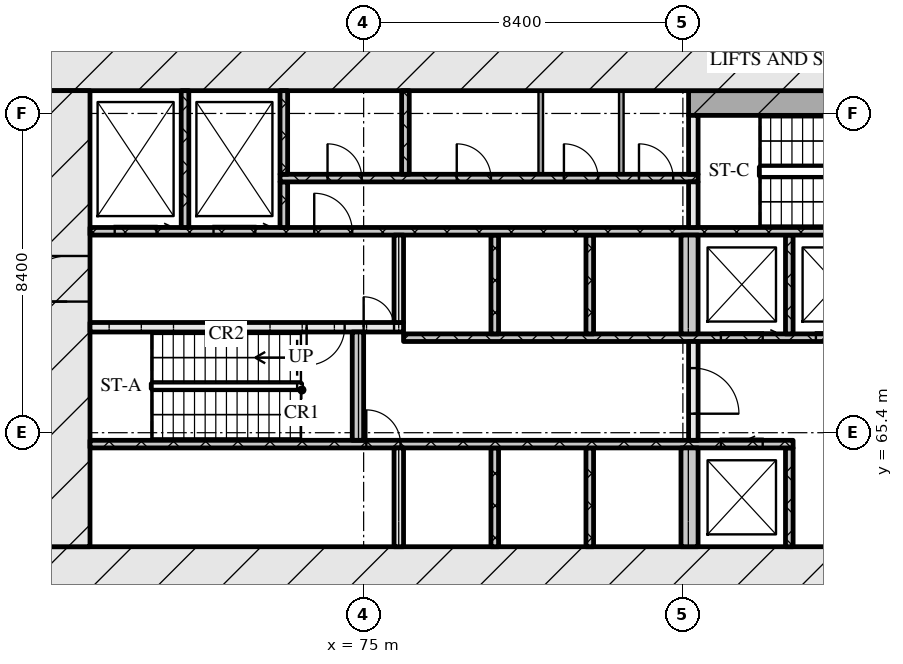
"""IFC4 building model, lengths in metres.
Left out: names, types, materials, properties, quantities, classifications, styles, units other than length and angle.
Written with IfcOpenShell. Run it as: python <this file> out.ifc"""

import sys

from ifc_helpers import new_model, si_unit, direction, frame, frame_2d, origin, place, context, subcontext, project, spatial, rectangle, extrude, element, fill, save


model = new_model("IFC4")
c1 = context("Model", 3, precision=1e-05, world=origin(), true_north=direction((0.0, 1.0)))
c2 = subcontext(c1, "Body", "Model", "MODEL_VIEW")
j1 = project(units=[si_unit("LENGTHUNIT", "METRE"), si_unit("PLANEANGLEUNIT", "RADIAN")], contexts=[c1])
p1 = place(None, origin())
s1 = spatial("IfcSite", under=j1, at=p1, CompositionType="ELEMENT")
p2 = place(p1, origin())
s2 = spatial("IfcBuilding", under=s1, at=p2, CompositionType="ELEMENT")
p3 = place(p2, frame((0.0, 0.0, 9.0)))
s3 = spatial("IfcBuildingStorey", under=s2, at=p3, CompositionType="ELEMENT", Elevation=9.0)
p4 = place(p3, frame((66.6, 61.8, 0.0), z_axis=(0.0, 0.0, 1.0), x_axis=(1.0, 0.0, 0.0)))
e1 = element("IfcWall", 1, at=p4, inside=s3, PredefinedType="SOLIDWALL", context=c2, shape_type="SweptSolid", body=[
    extrude(rectangle(XDim=42.0, YDim=1.2, at=frame_2d((21.0, 0.0))), origin(), (0.0, 0.0, 1.0), 5.1),
])
p5 = place(p4, frame((21.35, 0.0, 0.0)))
e2 = element("IfcOpeningElement", 2, at=p5, cuts=e1, PredefinedType="OPENING", context=c2, shape_type="SweptSolid", body=[
    extrude(rectangle(XDim=1.8, YDim=2.1, at=frame_2d((0.9, 1.05))), frame((0.0, 0.61, 0.0), z_axis=(0.0, -1.0, 0.0), x_axis=(1.0, 0.0, 0.0)), (0.0, 0.0, 1.0), 1.22),
])
p6 = place(p3, frame((66.6, 75.0, 0.0), z_axis=(0.0, 0.0, 1.0), x_axis=(1.0, 0.0, 0.0)))
e3 = element("IfcWall", 3, at=p6, inside=s3, PredefinedType="SOLIDWALL", context=c2, shape_type="SweptSolid", body=[
    extrude(rectangle(XDim=42.0, YDim=1.2, at=frame_2d((21.0, 0.0))), origin(), (0.0, 0.0, 1.0), 5.1),
])
p7 = place(p3, frame((67.2, 62.4, 0.0), z_axis=(0.0, 0.0, 1.0), x_axis=(0.0, 1.0, 0.0)))
e4 = element("IfcWall", 4, at=p7, inside=s3, PredefinedType="SOLIDWALL", context=c2, shape_type="SweptSolid", body=[
    extrude(rectangle(XDim=12.0, YDim=1.2, at=frame_2d((6.0, 0.0))), origin(), (0.0, 0.0, 1.0), 5.1),
])
p8 = place(p7, frame((6.45, 0.0, 0.0)))
e5 = element("IfcOpeningElement", 5, at=p8, cuts=e4, PredefinedType="OPENING", context=c2, shape_type="SweptSolid", body=[
    extrude(rectangle(XDim=1.2, YDim=2.1, at=frame_2d((0.6, 1.05))), frame((0.0, 0.61, 0.0), z_axis=(0.0, -1.0, 0.0), x_axis=(1.0, 0.0, 0.0)), (0.0, 0.0, 1.0), 1.22),
])
p9 = place(p3, frame((75.925, 62.4, 0.0), z_axis=(0.0, 0.0, 1.0), x_axis=(0.0, 1.0, 0.0)))
e6 = element("IfcWall", 6, at=p9, inside=s3, PredefinedType="SOLIDWALL", context=c2, shape_type="SweptSolid", body=[
    extrude(rectangle(XDim=2.6, YDim=0.25, at=frame_2d((1.3, 0.0))), origin(), (0.0, 0.0, 1.0), 5.1),
])
for number, where, z_axis, x_axis in (
    (7, (78.45, 62.4, 0.0), (0.0, 0.0, 1.0), (0.0, 1.0, 0.0)),
    (8, (80.95, 62.4, 0.0), (0.0, 0.0, 1.0), (0.0, 1.0, 0.0)),
):
    element("IfcWall", number, at=place(p3, frame(where, z_axis=z_axis, x_axis=x_axis)), inside=s3, PredefinedType="SOLIDWALL", context=c2, shape_type="SweptSolid", body=[
        extrude(rectangle(XDim=2.6, YDim=0.2, at=frame_2d((1.3, 0.0))), origin(), (0.0, 0.0, 1.0), 5.1),
    ])
p10 = place(p3, frame((83.575, 62.4, 0.0), z_axis=(0.0, 0.0, 1.0), x_axis=(0.0, 1.0, 0.0)))
e9 = element("IfcWall", 9, at=p10, inside=s3, PredefinedType="SOLIDWALL", context=c2, shape_type="SweptSolid", body=[
    extrude(rectangle(XDim=2.6, YDim=0.45, at=frame_2d((1.3, 0.0))), origin(), (0.0, 0.0, 1.0), 5.1),
])
p11 = place(p3, frame((86.2, 62.4, 0.0), z_axis=(0.0, 0.0, 1.0), x_axis=(0.0, 1.0, 0.0)))
e10 = element("IfcWall", 10, at=p11, inside=s3, PredefinedType="SOLIDWALL", context=c2, shape_type="SweptSolid", body=[
    extrude(rectangle(XDim=2.6, YDim=0.2, at=frame_2d((1.3, 0.0))), origin(), (0.0, 0.0, 1.0), 5.1),
])
p12 = place(p3, frame((67.8, 65.1, 0.0), z_axis=(0.0, 0.0, 1.0), x_axis=(1.0, 0.0, 0.0)))
e11 = element("IfcWall", 11, at=p12, inside=s3, PredefinedType="SOLIDWALL", context=c2, shape_type="SweptSolid", body=[
    extrude(rectangle(XDim=18.5, YDim=0.2, at=frame_2d((9.25, 0.0))), origin(), (0.0, 0.0, 1.0), 5.1),
])
p13 = place(p12, frame((7.27, 0.0, 0.0)))
e12 = element("IfcOpeningElement", 12, at=p13, cuts=e11, PredefinedType="OPENING", context=c2, shape_type="SweptSolid", body=[
    extrude(rectangle(XDim=0.9, YDim=2.1, at=frame_2d((0.45, 1.05))), frame((0.0, 0.11, 0.0), z_axis=(0.0, -1.0, 0.0), x_axis=(1.0, 0.0, 0.0)), (0.0, 0.0, 1.0), 0.22),
])
p14 = place(p12, frame((16.6, 0.0, 0.0)))
e13 = element("IfcOpeningElement", 13, at=p14, cuts=e11, PredefinedType="OPENING", context=c2, shape_type="SweptSolid", body=[
    extrude(rectangle(XDim=1.1, YDim=2.1, at=frame_2d((0.55, 1.05))), frame((0.0, 0.11, 0.0), z_axis=(0.0, -1.0, 0.0), x_axis=(1.0, 0.0, 0.0)), (0.0, 0.0, 1.0), 0.22),
])
p15 = place(p3, frame((74.85, 65.2, 0.0), z_axis=(0.0, 0.0, 1.0), x_axis=(0.0, 1.0, 0.0)))
e14 = element("IfcWall", 14, at=p15, inside=s3, PredefinedType="SOLIDWALL", context=c2, shape_type="SweptSolid", body=[
    extrude(rectangle(XDim=2.85, YDim=0.3, at=frame_2d((1.425, 0.0))), origin(), (0.0, 0.0, 1.0), 5.1),
])
p16 = place(p3, frame((83.675, 65.2, 0.0), z_axis=(0.0, 0.0, 1.0), x_axis=(0.0, 1.0, 0.0)))
e15 = element("IfcWall", 15, at=p16, inside=s3, PredefinedType="SOLIDWALL", context=c2, shape_type="SweptSolid", body=[
    extrude(rectangle(XDim=2.6, YDim=0.25, at=frame_2d((1.3, 0.0))), origin(), (0.0, 0.0, 1.0), 5.1),
])
p17 = place(p16, frame((0.7, 0.0, 0.0)))
e16 = element("IfcOpeningElement", 16, at=p17, cuts=e15, PredefinedType="OPENING", context=c2, shape_type="SweptSolid", body=[
    extrude(rectangle(XDim=1.2, YDim=2.1, at=frame_2d((0.6, 1.05))), frame((0.0, 0.135, 0.0), z_axis=(0.0, -1.0, 0.0), x_axis=(1.0, 0.0, 0.0)), (0.0, 0.0, 1.0), 0.27),
])
p18 = place(p3, frame((76.05, 67.9, 0.0), z_axis=(0.0, 0.0, 1.0), x_axis=(1.0, 0.0, 0.0)))
e17 = element("IfcWall", 17, at=p18, inside=s3, PredefinedType="SOLIDWALL", context=c2, shape_type="SweptSolid", body=[
    extrude(rectangle(XDim=23.1, YDim=0.2, at=frame_2d((11.55, 0.0))), origin(), (0.0, 0.0, 1.0), 5.1),
])
p19 = place(p18, frame((8.35, 0.0, 0.0)))
e18 = element("IfcOpeningElement", 18, at=p19, cuts=e17, PredefinedType="OPENING", context=c2, shape_type="SweptSolid", body=[
    extrude(rectangle(XDim=1.1, YDim=2.1, at=frame_2d((0.55, 1.05))), frame((0.0, 0.11, 0.0), z_axis=(0.0, -1.0, 0.0), x_axis=(1.0, 0.0, 0.0)), (0.0, 0.0, 1.0), 0.22),
])
p20 = place(p18, frame((10.85, 0.0, 0.0)))
e19 = element("IfcOpeningElement", 19, at=p20, cuts=e17, PredefinedType="OPENING", context=c2, shape_type="SweptSolid", body=[
    extrude(rectangle(XDim=1.1, YDim=2.1, at=frame_2d((0.55, 1.05))), frame((0.0, 0.11, 0.0), z_axis=(0.0, -1.0, 0.0), x_axis=(1.0, 0.0, 0.0)), (0.0, 0.0, 1.0), 0.22),
])
p21 = place(p18, frame((13.55, 0.0, 0.0)))
e20 = element("IfcOpeningElement", 20, at=p21, cuts=e17, PredefinedType="OPENING", context=c2, shape_type="SweptSolid", body=[
    extrude(rectangle(XDim=1.0, YDim=2.1, at=frame_2d((0.5, 1.05))), frame((0.0, 0.11, 0.0), z_axis=(0.0, -1.0, 0.0), x_axis=(1.0, 0.0, 0.0)), (0.0, 0.0, 1.0), 0.22),
])
for number, where, z_axis, x_axis in (
    (21, (78.45, 68.0, 0.0), (0.0, 0.0, 1.0), (0.0, 1.0, 0.0)),
    (22, (80.95, 68.0, 0.0), (0.0, 0.0, 1.0), (0.0, 1.0, 0.0)),
):
    element("IfcWall", number, at=place(p3, frame(where, z_axis=z_axis, x_axis=x_axis)), inside=s3, PredefinedType="SOLIDWALL", context=c2, shape_type="SweptSolid", body=[
        extrude(rectangle(XDim=2.6, YDim=0.2, at=frame_2d((1.3, 0.0))), origin(), (0.0, 0.0, 1.0), 5.1),
    ])
p22 = place(p3, frame((83.575, 68.0, 0.0), z_axis=(0.0, 0.0, 1.0), x_axis=(0.0, 1.0, 0.0)))
e23 = element("IfcWall", 23, at=p22, inside=s3, PredefinedType="SOLIDWALL", context=c2, shape_type="SweptSolid", body=[
    extrude(rectangle(XDim=2.6, YDim=0.45, at=frame_2d((1.3, 0.0))), origin(), (0.0, 0.0, 1.0), 5.1),
])
p23 = place(p3, frame((86.2, 68.0, 0.0), z_axis=(0.0, 0.0, 1.0), x_axis=(0.0, 1.0, 0.0)))
e24 = element("IfcWall", 24, at=p23, inside=s3, PredefinedType="SOLIDWALL", context=c2, shape_type="SweptSolid", body=[
    extrude(rectangle(XDim=2.6, YDim=0.2, at=frame_2d((1.3, 0.0))), origin(), (0.0, 0.0, 1.0), 5.1),
])
p24 = place(p3, frame((67.8, 68.175, 0.0), z_axis=(0.0, 0.0, 1.0), x_axis=(1.0, 0.0, 0.0)))
e25 = element("IfcWall", 25, at=p24, inside=s3, PredefinedType="SOLIDWALL", context=c2, shape_type="SweptSolid", body=[
    extrude(rectangle(XDim=8.25, YDim=0.25, at=frame_2d((4.125, 0.0))), origin(), (0.0, 0.0, 1.0), 5.1),
])
p25 = place(p24, frame((5.7, 0.0, 0.0)))
e26 = element("IfcOpeningElement", 26, at=p25, cuts=e25, PredefinedType="OPENING", context=c2, shape_type="SweptSolid", body=[
    extrude(rectangle(XDim=1.0, YDim=2.1, at=frame_2d((0.5, 1.05))), frame((0.0, 0.135, 0.0), z_axis=(0.0, -1.0, 0.0), x_axis=(1.0, 0.0, 0.0)), (0.0, 0.0, 1.0), 0.27),
])
p26 = place(p24, frame((7.2, 0.0, 0.0)))
e27 = element("IfcOpeningElement", 27, at=p26, cuts=e25, PredefinedType="OPENING", context=c2, shape_type="SweptSolid", body=[
    extrude(rectangle(XDim=0.8, YDim=2.1, at=frame_2d((0.4, 1.05))), frame((0.0, 0.135, 0.0), z_axis=(0.0, -1.0, 0.0), x_axis=(1.0, 0.0, 0.0)), (0.0, 0.0, 1.0), 0.27),
])
p27 = place(p3, frame((75.925, 68.3, 0.0), z_axis=(0.0, 0.0, 1.0), x_axis=(0.0, 1.0, 0.0)))
e28 = element("IfcWall", 28, at=p27, inside=s3, PredefinedType="SOLIDWALL", context=c2, shape_type="SweptSolid", body=[
    extrude(rectangle(XDim=2.3, YDim=0.25, at=frame_2d((1.15, 0.0))), origin(), (0.0, 0.0, 1.0), 5.1),
])
p28 = place(p3, frame((67.8, 70.7, 0.0), z_axis=(0.0, 0.0, 1.0), x_axis=(1.0, 0.0, 0.0)))
e29 = element("IfcWall", 29, at=p28, inside=s3, PredefinedType="SOLIDWALL", context=c2, shape_type="SweptSolid", body=[
    extrude(rectangle(XDim=39.6, YDim=0.2, at=frame_2d((19.8, 0.0))), origin(), (0.0, 0.0, 1.0), 5.1),
])
p29 = place(p28, frame((0.65, 0.0, 0.0)))
e30 = element("IfcOpeningElement", 30, at=p29, cuts=e29, PredefinedType="OPENING", context=c2, shape_type="SweptSolid", body=[
    extrude(rectangle(XDim=1.1, YDim=2.1, at=frame_2d((0.55, 1.05))), frame((0.0, 0.11, 0.0), z_axis=(0.0, -1.0, 0.0), x_axis=(1.0, 0.0, 0.0)), (0.0, 0.0, 1.0), 0.22),
])
p30 = place(p28, frame((3.25, 0.0, 0.0)))
e31 = element("IfcOpeningElement", 31, at=p30, cuts=e29, PredefinedType="OPENING", context=c2, shape_type="SweptSolid", body=[
    extrude(rectangle(XDim=1.1, YDim=2.1, at=frame_2d((0.55, 1.05))), frame((0.0, 0.11, 0.0), z_axis=(0.0, -1.0, 0.0), x_axis=(1.0, 0.0, 0.0)), (0.0, 0.0, 1.0), 0.22),
])
p31 = place(p28, frame((5.9, 0.0, 0.0)))
e32 = element("IfcOpeningElement", 32, at=p31, cuts=e29, PredefinedType="OPENING", context=c2, shape_type="SweptSolid", body=[
    extrude(rectangle(XDim=1.0, YDim=2.1, at=frame_2d((0.5, 1.05))), frame((0.0, 0.11, 0.0), z_axis=(0.0, -1.0, 0.0), x_axis=(1.0, 0.0, 0.0)), (0.0, 0.0, 1.0), 0.22),
])
p32 = place(p28, frame((21.7, 0.0, 0.0)))
e33 = element("IfcOpeningElement", 33, at=p32, cuts=e29, PredefinedType="OPENING", context=c2, shape_type="SweptSolid", body=[
    extrude(rectangle(XDim=1.0, YDim=2.1, at=frame_2d((0.5, 1.05))), frame((0.0, 0.11, 0.0), z_axis=(0.0, -1.0, 0.0), x_axis=(1.0, 0.0, 0.0)), (0.0, 0.0, 1.0), 0.22),
])
p33 = place(p28, frame((32.7, 0.0, 0.0)))
e34 = element("IfcOpeningElement", 34, at=p33, cuts=e29, PredefinedType="OPENING", context=c2, shape_type="SweptSolid", body=[
    extrude(rectangle(XDim=1.0, YDim=2.1, at=frame_2d((0.5, 1.05))), frame((0.0, 0.11, 0.0), z_axis=(0.0, -1.0, 0.0), x_axis=(1.0, 0.0, 0.0)), (0.0, 0.0, 1.0), 0.22),
])
p34 = place(p28, frame((35.25, 0.0, 0.0)))
e35 = element("IfcOpeningElement", 35, at=p34, cuts=e29, PredefinedType="OPENING", context=c2, shape_type="SweptSolid", body=[
    extrude(rectangle(XDim=1.1, YDim=2.1, at=frame_2d((0.55, 1.05))), frame((0.0, 0.11, 0.0), z_axis=(0.0, -1.0, 0.0), x_axis=(1.0, 0.0, 0.0)), (0.0, 0.0, 1.0), 0.22),
])
p35 = place(p28, frame((37.85, 0.0, 0.0)))
e36 = element("IfcOpeningElement", 36, at=p35, cuts=e29, PredefinedType="OPENING", context=c2, shape_type="SweptSolid", body=[
    extrude(rectangle(XDim=1.1, YDim=2.1, at=frame_2d((0.55, 1.05))), frame((0.0, 0.11, 0.0), z_axis=(0.0, -1.0, 0.0), x_axis=(1.0, 0.0, 0.0)), (0.0, 0.0, 1.0), 0.22),
])
p36 = place(p3, frame((70.3, 70.8, 0.0), z_axis=(0.0, 0.0, 1.0), x_axis=(0.0, 1.0, 0.0)))
e37 = element("IfcWall", 37, at=p36, inside=s3, PredefinedType="SOLIDWALL", context=c2, shape_type="SweptSolid", body=[
    extrude(rectangle(XDim=3.6, YDim=0.2, at=frame_2d((1.8, 0.0))), origin(), (0.0, 0.0, 1.0), 5.1),
])
p37 = place(p3, frame((72.9, 70.8, 0.0), z_axis=(0.0, 0.0, 1.0), x_axis=(0.0, 1.0, 0.0)))
e38 = element("IfcWall", 38, at=p37, inside=s3, PredefinedType="SOLIDWALL", context=c2, shape_type="SweptSolid", body=[
    extrude(rectangle(XDim=1.2, YDim=0.2, at=frame_2d((0.6, 0.0))), origin(), (0.0, 0.0, 1.0), 5.1),
])
p38 = place(p3, frame((83.675, 70.8, 0.0), z_axis=(0.0, 0.0, 1.0), x_axis=(0.0, 1.0, 0.0)))
e39 = element("IfcWall", 39, at=p38, inside=s3, PredefinedType="SOLIDWALL", context=c2, shape_type="SweptSolid", body=[
    extrude(rectangle(XDim=1.2, YDim=0.25, at=frame_2d((0.6, 0.0))), origin(), (0.0, 0.0, 1.0), 5.1),
])
p39 = place(p3, frame((72.8, 72.1, 0.0), z_axis=(0.0, 0.0, 1.0), x_axis=(1.0, 0.0, 0.0)))
e40 = element("IfcWall", 40, at=p39, inside=s3, PredefinedType="SOLIDWALL", context=c2, shape_type="SweptSolid", body=[
    extrude(rectangle(XDim=11.0, YDim=0.2, at=frame_2d((5.5, 0.0))), origin(), (0.0, 0.0, 1.0), 5.1),
])
p40 = place(p39, frame((1.25, 0.0, 0.0)))
e41 = element("IfcOpeningElement", 41, at=p40, cuts=e40, PredefinedType="OPENING", context=c2, shape_type="SweptSolid", body=[
    extrude(rectangle(XDim=0.9, YDim=2.1, at=frame_2d((0.45, 1.05))), frame((0.0, 0.11, 0.0), z_axis=(0.0, -1.0, 0.0), x_axis=(1.0, 0.0, 0.0)), (0.0, 0.0, 1.0), 0.22),
])
p41 = place(p39, frame((4.65, 0.0, 0.0)))
e42 = element("IfcOpeningElement", 42, at=p41, cuts=e40, PredefinedType="OPENING", context=c2, shape_type="SweptSolid", body=[
    extrude(rectangle(XDim=0.9, YDim=2.1, at=frame_2d((0.45, 1.05))), frame((0.0, 0.11, 0.0), z_axis=(0.0, -1.0, 0.0), x_axis=(1.0, 0.0, 0.0)), (0.0, 0.0, 1.0), 0.22),
])
p42 = place(p39, frame((7.47, 0.0, 0.0)))
e43 = element("IfcOpeningElement", 43, at=p42, cuts=e40, PredefinedType="OPENING", context=c2, shape_type="SweptSolid", body=[
    extrude(rectangle(XDim=0.9, YDim=2.1, at=frame_2d((0.45, 1.05))), frame((0.0, 0.11, 0.0), z_axis=(0.0, -1.0, 0.0), x_axis=(1.0, 0.0, 0.0)), (0.0, 0.0, 1.0), 0.22),
])
p43 = place(p39, frame((9.445, 0.0, 0.0)))
e44 = element("IfcOpeningElement", 44, at=p43, cuts=e40, PredefinedType="OPENING", context=c2, shape_type="SweptSolid", body=[
    extrude(rectangle(XDim=0.9, YDim=2.1, at=frame_2d((0.45, 1.05))), frame((0.0, 0.11, 0.0), z_axis=(0.0, -1.0, 0.0), x_axis=(1.0, 0.0, 0.0)), (0.0, 0.0, 1.0), 0.22),
])
for number, where, z_axis, x_axis in (
    (45, (72.9, 72.2, 0.0), (0.0, 0.0, 1.0), (0.0, 1.0, 0.0)),
    (46, (76.1, 72.2, 0.0), (0.0, 0.0, 1.0), (0.0, 1.0, 0.0)),
):
    element("IfcWall", number, at=place(p3, frame(where, z_axis=z_axis, x_axis=x_axis)), inside=s3, PredefinedType="SOLIDWALL", context=c2, shape_type="SweptSolid", body=[
        extrude(rectangle(XDim=2.2, YDim=0.2, at=frame_2d((1.1, 0.0))), origin(), (0.0, 0.0, 1.0), 5.1),
    ])
for number, where, z_axis, x_axis in (
    (47, (79.66, 72.2, 0.0), (0.0, 0.0, 1.0), (0.0, 1.0, 0.0)),
    (48, (81.78, 72.2, 0.0), (0.0, 0.0, 1.0), (0.0, 1.0, 0.0)),
):
    element("IfcWall", number, at=place(p3, frame(where, z_axis=z_axis, x_axis=x_axis)), inside=s3, PredefinedType="PARTITIONING", context=c2, shape_type="SweptSolid", body=[
        extrude(rectangle(XDim=2.2, YDim=0.12, at=frame_2d((1.1, 0.0))), origin(), (0.0, 0.0, 1.0), 5.1),
    ])
p44 = place(p3, frame((83.675, 72.2, 0.0), z_axis=(0.0, 0.0, 1.0), x_axis=(0.0, 1.0, 0.0)))
e49 = element("IfcWall", 49, at=p44, inside=s3, PredefinedType="SOLIDWALL", context=c2, shape_type="SweptSolid", body=[
    extrude(rectangle(XDim=1.55, YDim=0.25, at=frame_2d((0.775, 0.0))), origin(), (0.0, 0.0, 1.0), 5.1),
])
p45 = place(p3, frame((83.55, 74.075, 0.0), z_axis=(0.0, 0.0, 1.0), x_axis=(1.0, 0.0, 0.0)))
e50 = element("IfcWall", 50, at=p45, inside=s3, PredefinedType="SOLIDWALL", context=c2, shape_type="SweptSolid", body=[
    extrude(rectangle(XDim=8.1, YDim=0.65, at=frame_2d((4.05, 0.0))), origin(), (0.0, 0.0, 1.0), 5.1),
])
p46 = place(p13, origin())
e51 = element("IfcDoor", 51, at=p46, inside=s3, OperationType="SINGLE_SWING_LEFT", PredefinedType="DOOR", context=c2, shape_type="SweptSolid", body=[
    extrude(rectangle(XDim=0.9, YDim=2.1, at=frame_2d((0.45, 1.05))), frame((0.0, 0.025, 0.0), z_axis=(0.0, -1.0, 0.0), x_axis=(1.0, 0.0, 0.0)), (0.0, 0.0, 1.0), 0.05),
])
fill(e12, e51)
p47 = place(p14, origin())
e52 = element("IfcDoor", 52, at=p47, inside=s3, OperationType="SLIDING_TO_LEFT", PredefinedType="DOOR", context=c2, shape_type="SweptSolid", body=[
    extrude(rectangle(XDim=1.1, YDim=2.1, at=frame_2d((0.55, 1.05))), frame((0.0, 0.025, 0.0), z_axis=(0.0, -1.0, 0.0), x_axis=(1.0, 0.0, 0.0)), (0.0, 0.0, 1.0), 0.05),
])
fill(e13, e52)
p48 = place(p17, origin())
e53 = element("IfcDoor", 53, at=p48, inside=s3, OperationType="SINGLE_SWING_RIGHT", PredefinedType="DOOR", context=c2, shape_type="SweptSolid", body=[
    extrude(rectangle(XDim=1.2, YDim=2.1, at=frame_2d((0.6, 1.05))), frame((0.0, 0.025, 0.0), z_axis=(0.0, -1.0, 0.0), x_axis=(1.0, 0.0, 0.0)), (0.0, 0.0, 1.0), 0.05),
])
fill(e16, e53)
p49 = place(p19, origin())
e54 = element("IfcDoor", 54, at=p49, inside=s3, OperationType="SLIDING_TO_RIGHT", PredefinedType="DOOR", context=c2, shape_type="SweptSolid", body=[
    extrude(rectangle(XDim=1.1, YDim=2.1, at=frame_2d((0.55, 1.05))), frame((0.0, 0.025, 0.0), z_axis=(0.0, -1.0, 0.0), x_axis=(1.0, 0.0, 0.0)), (0.0, 0.0, 1.0), 0.05),
])
fill(e18, e54)
p50 = place(p20, origin())
e55 = element("IfcDoor", 55, at=p50, inside=s3, OperationType="SLIDING_TO_RIGHT", PredefinedType="DOOR", context=c2, shape_type="SweptSolid", body=[
    extrude(rectangle(XDim=1.1, YDim=2.1, at=frame_2d((0.55, 1.05))), frame((0.0, 0.025, 0.0), z_axis=(0.0, -1.0, 0.0), x_axis=(1.0, 0.0, 0.0)), (0.0, 0.0, 1.0), 0.05),
])
fill(e19, e55)
p51 = place(p25, origin())
e56 = element("IfcDoor", 56, at=p51, inside=s3, OperationType="SINGLE_SWING_RIGHT", PredefinedType="DOOR", context=c2, shape_type="SweptSolid", body=[
    extrude(rectangle(XDim=1.0, YDim=2.1, at=frame_2d((0.5, 1.05))), frame((0.0, 0.025, 0.0), z_axis=(0.0, -1.0, 0.0), x_axis=(1.0, 0.0, 0.0)), (0.0, 0.0, 1.0), 0.05),
])
fill(e26, e56)
p52 = place(p26, origin())
e57 = element("IfcDoor", 57, at=p52, inside=s3, OperationType="SINGLE_SWING_LEFT", PredefinedType="DOOR", context=c2, shape_type="SweptSolid", body=[
    extrude(rectangle(XDim=0.8, YDim=2.1, at=frame_2d((0.4, 1.05))), frame((0.0, 0.025, 0.0), z_axis=(0.0, -1.0, 0.0), x_axis=(1.0, 0.0, 0.0)), (0.0, 0.0, 1.0), 0.05),
])
fill(e27, e57)
p53 = place(p8, origin())
e58 = element("IfcDoor", 58, at=p53, inside=s3, OperationType="SINGLE_SWING_LEFT", PredefinedType="DOOR", context=c2, shape_type="SweptSolid", body=[
    extrude(rectangle(XDim=1.2, YDim=2.1, at=frame_2d((0.6, 1.05))), frame((0.0, 0.025, 0.0), z_axis=(0.0, -1.0, 0.0), x_axis=(1.0, 0.0, 0.0)), (0.0, 0.0, 1.0), 0.05),
])
fill(e5, e58)
p54 = place(p29, origin())
e59 = element("IfcDoor", 59, at=p54, inside=s3, OperationType="SLIDING_TO_RIGHT", PredefinedType="DOOR", context=c2, shape_type="SweptSolid", body=[
    extrude(rectangle(XDim=1.1, YDim=2.1, at=frame_2d((0.55, 1.05))), frame((0.0, 0.025, 0.0), z_axis=(0.0, -1.0, 0.0), x_axis=(1.0, 0.0, 0.0)), (0.0, 0.0, 1.0), 0.05),
])
fill(e30, e59)
p55 = place(p30, origin())
e60 = element("IfcDoor", 60, at=p55, inside=s3, OperationType="SLIDING_TO_RIGHT", PredefinedType="DOOR", context=c2, shape_type="SweptSolid", body=[
    extrude(rectangle(XDim=1.1, YDim=2.1, at=frame_2d((0.55, 1.05))), frame((0.0, 0.025, 0.0), z_axis=(0.0, -1.0, 0.0), x_axis=(1.0, 0.0, 0.0)), (0.0, 0.0, 1.0), 0.05),
])
fill(e31, e60)
p56 = place(p31, origin())
e61 = element("IfcDoor", 61, at=p56, inside=s3, OperationType="SINGLE_SWING_LEFT", PredefinedType="DOOR", context=c2, shape_type="SweptSolid", body=[
    extrude(rectangle(XDim=1.0, YDim=2.1, at=frame_2d((0.5, 1.05))), frame((0.0, 0.025, 0.0), z_axis=(0.0, -1.0, 0.0), x_axis=(1.0, 0.0, 0.0)), (0.0, 0.0, 1.0), 0.05),
])
fill(e32, e61)
p57 = place(p40, origin())
e62 = element("IfcDoor", 62, at=p57, inside=s3, OperationType="SINGLE_SWING_LEFT", PredefinedType="DOOR", context=c2, shape_type="SweptSolid", body=[
    extrude(rectangle(XDim=0.9, YDim=2.1, at=frame_2d((0.45, 1.05))), frame((0.0, 0.025, 0.0), z_axis=(0.0, -1.0, 0.0), x_axis=(1.0, 0.0, 0.0)), (0.0, 0.0, 1.0), 0.05),
])
fill(e41, e62)
p58 = place(p41, origin())
e63 = element("IfcDoor", 63, at=p58, inside=s3, OperationType="SINGLE_SWING_LEFT", PredefinedType="DOOR", context=c2, shape_type="SweptSolid", body=[
    extrude(rectangle(XDim=0.9, YDim=2.1, at=frame_2d((0.45, 1.05))), frame((0.0, 0.025, 0.0), z_axis=(0.0, -1.0, 0.0), x_axis=(1.0, 0.0, 0.0)), (0.0, 0.0, 1.0), 0.05),
])
fill(e42, e63)
p59 = place(p42, origin())
e64 = element("IfcDoor", 64, at=p59, inside=s3, OperationType="SINGLE_SWING_LEFT", PredefinedType="DOOR", context=c2, shape_type="SweptSolid", body=[
    extrude(rectangle(XDim=0.9, YDim=2.1, at=frame_2d((0.45, 1.05))), frame((0.0, 0.025, 0.0), z_axis=(0.0, -1.0, 0.0), x_axis=(1.0, 0.0, 0.0)), (0.0, 0.0, 1.0), 0.05),
])
fill(e43, e64)
p60 = place(p43, origin())
e65 = element("IfcDoor", 65, at=p60, inside=s3, OperationType="SINGLE_SWING_LEFT", PredefinedType="DOOR", context=c2, shape_type="SweptSolid", body=[
    extrude(rectangle(XDim=0.9, YDim=2.1, at=frame_2d((0.45, 1.05))), frame((0.0, 0.025, 0.0), z_axis=(0.0, -1.0, 0.0), x_axis=(1.0, 0.0, 0.0)), (0.0, 0.0, 1.0), 0.05),
])
fill(e44, e65)
save(model, sys.argv[1])
